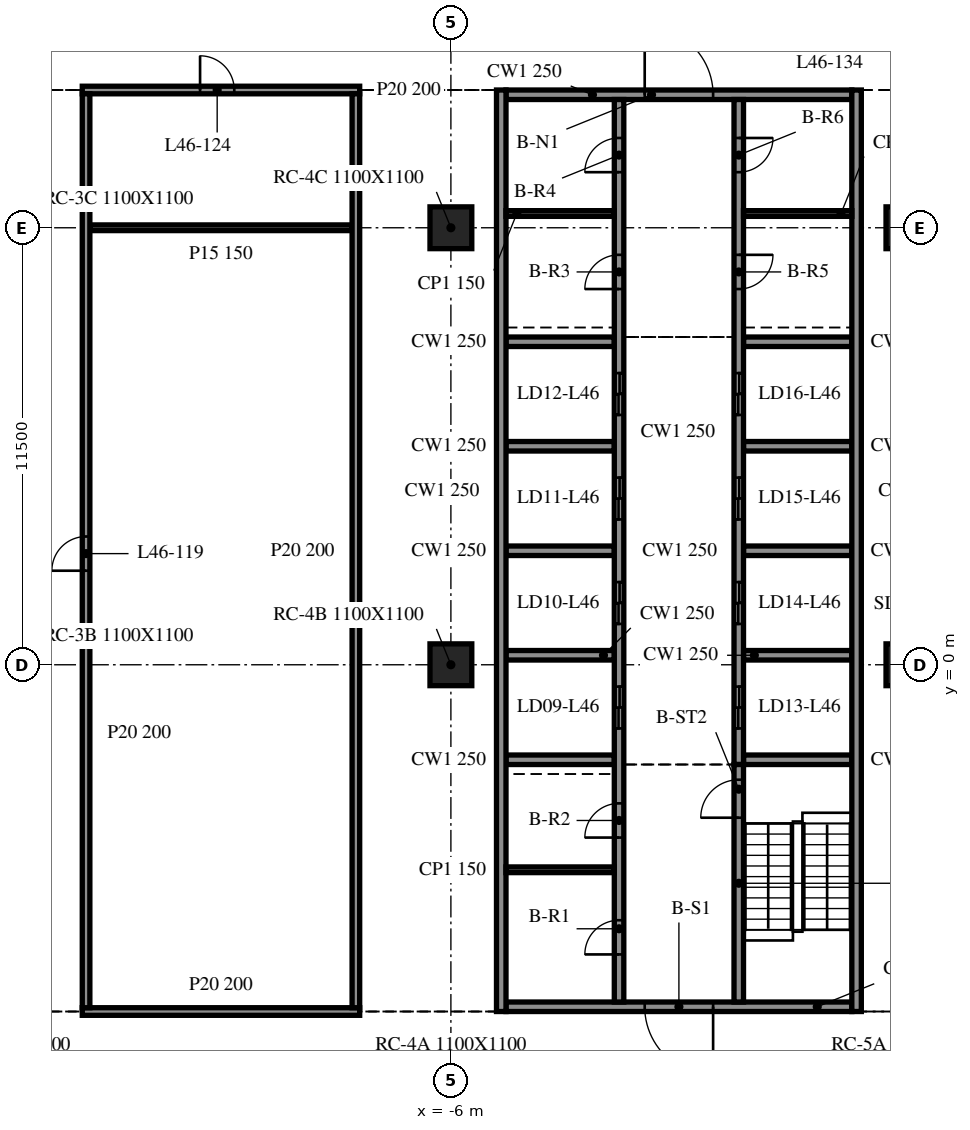
"""IFC4 building model, lengths in metres.
Left out: names, types, materials, properties, quantities, classifications, styles, units other than length and angle.
Written with IfcOpenShell. Run it as: python <this file> out.ifc"""

import sys

from ifc_helpers import new_model, si_unit, direction, frame, frame_2d, origin, origin_2d, place, context, subcontext, project, spatial, rectangle, extrude, element, fill, save


model = new_model("IFC4")
c1 = context("Model", 3, precision=1e-05, world=origin(), true_north=direction((0.0, 1.0)))
c2 = subcontext(c1, "Body", "Model", "MODEL_VIEW")
j1 = project(units=[si_unit("LENGTHUNIT", "METRE"), si_unit("PLANEANGLEUNIT", "RADIAN")], contexts=[c1])
p1 = place(None, origin())
s1 = spatial("IfcSite", under=j1, at=p1, CompositionType="ELEMENT")
p2 = place(p1, origin())
s2 = spatial("IfcBuilding", under=s1, at=p2, CompositionType="ELEMENT")
p3 = place(p2, frame((0.0, 0.0, 193.9)))
s3 = spatial("IfcBuildingStorey", under=s2, at=p3, CompositionType="ELEMENT", Elevation=193.9)
for number, where, z_axis, x_axis in (
    (1, (-6.0, 0.0, -0.34), (0.0, 0.0, 1.0), (1.0, 0.0, 0.0)),
    (2, (-6.0, 11.5, -0.34), (0.0, 0.0, 1.0), (1.0, 0.0, 0.0)),
    (3, (6.0, 0.0, -0.34), (0.0, 0.0, 1.0), (1.0, 0.0, 0.0)),
    (4, (6.0, 11.5, -0.34), (0.0, 0.0, 1.0), (1.0, 0.0, 0.0)),
):
    element("IfcColumn", number, at=place(p3, frame(where, z_axis=z_axis, x_axis=x_axis)), inside=s3, PredefinedType="COLUMN", context=c2, shape_type="SweptSolid", body=[
        extrude(rectangle(XDim=1.1, YDim=1.1, at=origin_2d()), origin(), (0.0, 0.0, 1.0), 3.8),
    ])
for number, where, z_axis, x_axis in (
    (5, (-4.675, 15.125, 0.0), (0.0, 0.0, 1.0), (0.0, -1.0, 0.0)),
    (6, (4.675, -9.125, 0.0), (0.0, 0.0, 1.0), (0.0, 1.0, 0.0)),
):
    element("IfcWall", number, at=place(p3, frame(where, z_axis=z_axis, x_axis=x_axis)), inside=s3, PredefinedType="SOLIDWALL", context=c2, shape_type="SweptSolid", body=[
        extrude(rectangle(XDim=24.25, YDim=0.25, at=frame_2d((12.125, 0.0))), origin(), (0.0, 0.0, 1.0), 3.46),
    ])
p4 = place(p3, frame((4.55, -9.0, 0.0), z_axis=(0.0, 0.0, 1.0), x_axis=(-1.0, 0.0, 0.0)))
e7 = element("IfcWall", 7, at=p4, inside=s3, PredefinedType="SOLIDWALL", context=c2, shape_type="SweptSolid", body=[
    extrude(rectangle(XDim=9.1, YDim=0.25, at=frame_2d((4.55, 0.0))), origin(), (0.0, 0.0, 1.0), 3.46),
])
p5 = place(p4, frame((3.65, 0.0, 0.0)))
e8 = element("IfcOpeningElement", 8, at=p5, cuts=e7, PredefinedType="OPENING", context=c2, shape_type="SweptSolid", body=[
    extrude(rectangle(XDim=1.8, YDim=2.1, at=frame_2d((0.9, 1.05))), frame((0.0, 0.135, 0.0), z_axis=(0.0, -1.0, 0.0), x_axis=(1.0, 0.0, 0.0)), (0.0, 0.0, 1.0), 0.27),
])
p6 = place(p3, frame((-4.55, 15.0, 0.0), z_axis=(0.0, 0.0, 1.0), x_axis=(1.0, 0.0, 0.0)))
e9 = element("IfcWall", 9, at=p6, inside=s3, PredefinedType="SOLIDWALL", context=c2, shape_type="SweptSolid", body=[
    extrude(rectangle(XDim=9.1, YDim=0.25, at=frame_2d((4.55, 0.0))), origin(), (0.0, 0.0, 1.0), 3.46),
])
p7 = place(p6, frame((3.65, 0.0, 0.0)))
e10 = element("IfcOpeningElement", 10, at=p7, cuts=e9, PredefinedType="OPENING", context=c2, shape_type="SweptSolid", body=[
    extrude(rectangle(XDim=1.8, YDim=2.1, at=frame_2d((0.9, 1.05))), frame((0.0, 0.135, 0.0), z_axis=(0.0, -1.0, 0.0), x_axis=(1.0, 0.0, 0.0)), (0.0, 0.0, 1.0), 0.27),
])
p8 = place(p3, frame((-1.575, -8.875, 0.0), z_axis=(0.0, 0.0, 1.0), x_axis=(0.0, 1.0, 0.0)))
e11 = element("IfcWall", 11, at=p8, inside=s3, PredefinedType="SOLIDWALL", context=c2, shape_type="SweptSolid", body=[
    extrude(rectangle(XDim=23.75, YDim=0.25, at=frame_2d((11.875, 0.0))), origin(), (0.0, 0.0, 1.0), 3.46),
])
p9 = place(p8, frame((7.2, 0.0, 0.0)))
e12 = element("IfcOpeningElement", 12, at=p9, cuts=e11, PredefinedType="OPENING", context=c2, shape_type="SweptSolid", body=[
    extrude(rectangle(XDim=1.1, YDim=2.1, at=frame_2d((0.55, 1.05))), frame((0.0, 0.135, 0.0), z_axis=(0.0, -1.0, 0.0), x_axis=(1.0, 0.0, 0.0)), (0.0, 0.0, 1.0), 0.27),
])
p10 = place(p8, frame((9.95, 0.0, 0.0)))
e13 = element("IfcOpeningElement", 13, at=p10, cuts=e11, PredefinedType="OPENING", context=c2, shape_type="SweptSolid", body=[
    extrude(rectangle(XDim=1.1, YDim=2.1, at=frame_2d((0.55, 1.05))), frame((0.0, 0.135, 0.0), z_axis=(0.0, -1.0, 0.0), x_axis=(1.0, 0.0, 0.0)), (0.0, 0.0, 1.0), 0.27),
])
p11 = place(p8, frame((12.7, 0.0, 0.0)))
e14 = element("IfcOpeningElement", 14, at=p11, cuts=e11, PredefinedType="OPENING", context=c2, shape_type="SweptSolid", body=[
    extrude(rectangle(XDim=1.1, YDim=2.1, at=frame_2d((0.55, 1.05))), frame((0.0, 0.135, 0.0), z_axis=(0.0, -1.0, 0.0), x_axis=(1.0, 0.0, 0.0)), (0.0, 0.0, 1.0), 0.27),
])
p12 = place(p8, frame((15.45, 0.0, 0.0)))
e15 = element("IfcOpeningElement", 15, at=p12, cuts=e11, PredefinedType="OPENING", context=c2, shape_type="SweptSolid", body=[
    extrude(rectangle(XDim=1.1, YDim=2.1, at=frame_2d((0.55, 1.05))), frame((0.0, 0.135, 0.0), z_axis=(0.0, -1.0, 0.0), x_axis=(1.0, 0.0, 0.0)), (0.0, 0.0, 1.0), 0.27),
])
p13 = place(p8, frame((1.252, 0.0, 0.0)))
e16 = element("IfcOpeningElement", 16, at=p13, cuts=e11, PredefinedType="OPENING", context=c2, shape_type="SweptSolid", body=[
    extrude(rectangle(XDim=0.9, YDim=2.1, at=frame_2d((0.45, 1.05))), frame((0.0, 0.135, 0.0), z_axis=(0.0, -1.0, 0.0), x_axis=(1.0, 0.0, 0.0)), (0.0, 0.0, 1.0), 0.27),
])
p14 = place(p8, frame((4.327, 0.0, 0.0)))
e17 = element("IfcOpeningElement", 17, at=p14, cuts=e11, PredefinedType="OPENING", context=c2, shape_type="SweptSolid", body=[
    extrude(rectangle(XDim=0.9, YDim=2.1, at=frame_2d((0.45, 1.05))), frame((0.0, 0.135, 0.0), z_axis=(0.0, -1.0, 0.0), x_axis=(1.0, 0.0, 0.0)), (0.0, 0.0, 1.0), 0.27),
])
p15 = place(p8, frame((18.762, 0.0, 0.0)))
e18 = element("IfcOpeningElement", 18, at=p15, cuts=e11, PredefinedType="OPENING", context=c2, shape_type="SweptSolid", body=[
    extrude(rectangle(XDim=0.9, YDim=2.1, at=frame_2d((0.45, 1.05))), frame((0.0, 0.135, 0.0), z_axis=(0.0, -1.0, 0.0), x_axis=(1.0, 0.0, 0.0)), (0.0, 0.0, 1.0), 0.27),
])
p16 = place(p8, frame((21.837, 0.0, 0.0)))
e19 = element("IfcOpeningElement", 19, at=p16, cuts=e11, PredefinedType="OPENING", context=c2, shape_type="SweptSolid", body=[
    extrude(rectangle(XDim=0.9, YDim=2.1, at=frame_2d((0.45, 1.05))), frame((0.0, 0.135, 0.0), z_axis=(0.0, -1.0, 0.0), x_axis=(1.0, 0.0, 0.0)), (0.0, 0.0, 1.0), 0.27),
])
p17 = place(p3, frame((1.575, -8.875, 0.0), z_axis=(0.0, 0.0, 1.0), x_axis=(0.0, 1.0, 0.0)))
e20 = element("IfcWall", 20, at=p17, inside=s3, PredefinedType="SOLIDWALL", context=c2, shape_type="SweptSolid", body=[
    extrude(rectangle(XDim=6.25, YDim=0.25, at=frame_2d((3.125, 0.0))), origin(), (0.0, 0.0, 1.0), 3.46),
])
p18 = place(p17, frame((4.85, 0.0, 0.0)))
e21 = element("IfcOpeningElement", 21, at=p18, cuts=e20, PredefinedType="OPENING", context=c2, shape_type="SweptSolid", body=[
    extrude(rectangle(XDim=1.0, YDim=2.1, at=frame_2d((0.5, 1.05))), frame((0.0, 0.135, 0.0), z_axis=(0.0, -1.0, 0.0), x_axis=(1.0, 0.0, 0.0)), (0.0, 0.0, 1.0), 0.27),
])
p19 = place(p3, frame((1.575, 14.875, 0.0), z_axis=(0.0, 0.0, 1.0), x_axis=(0.0, -1.0, 0.0)))
e22 = element("IfcWall", 22, at=p19, inside=s3, PredefinedType="SOLIDWALL", context=c2, shape_type="SweptSolid", body=[
    extrude(rectangle(XDim=17.5, YDim=0.25, at=frame_2d((8.75, 0.0))), origin(), (0.0, 0.0, 1.0), 3.46),
])
p20 = place(p19, frame((15.45, 0.0, 0.0)))
e23 = element("IfcOpeningElement", 23, at=p20, cuts=e22, PredefinedType="OPENING", context=c2, shape_type="SweptSolid", body=[
    extrude(rectangle(XDim=1.1, YDim=2.1, at=frame_2d((0.55, 1.05))), frame((0.0, 0.135, 0.0), z_axis=(0.0, -1.0, 0.0), x_axis=(1.0, 0.0, 0.0)), (0.0, 0.0, 1.0), 0.27),
])
p21 = place(p19, frame((12.7, 0.0, 0.0)))
e24 = element("IfcOpeningElement", 24, at=p21, cuts=e22, PredefinedType="OPENING", context=c2, shape_type="SweptSolid", body=[
    extrude(rectangle(XDim=1.1, YDim=2.1, at=frame_2d((0.55, 1.05))), frame((0.0, 0.135, 0.0), z_axis=(0.0, -1.0, 0.0), x_axis=(1.0, 0.0, 0.0)), (0.0, 0.0, 1.0), 0.27),
])
p22 = place(p19, frame((9.95, 0.0, 0.0)))
e25 = element("IfcOpeningElement", 25, at=p22, cuts=e22, PredefinedType="OPENING", context=c2, shape_type="SweptSolid", body=[
    extrude(rectangle(XDim=1.1, YDim=2.1, at=frame_2d((0.55, 1.05))), frame((0.0, 0.135, 0.0), z_axis=(0.0, -1.0, 0.0), x_axis=(1.0, 0.0, 0.0)), (0.0, 0.0, 1.0), 0.27),
])
p23 = place(p19, frame((7.2, 0.0, 0.0)))
e26 = element("IfcOpeningElement", 26, at=p23, cuts=e22, PredefinedType="OPENING", context=c2, shape_type="SweptSolid", body=[
    extrude(rectangle(XDim=1.1, YDim=2.1, at=frame_2d((0.55, 1.05))), frame((0.0, 0.135, 0.0), z_axis=(0.0, -1.0, 0.0), x_axis=(1.0, 0.0, 0.0)), (0.0, 0.0, 1.0), 0.27),
])
p24 = place(p19, frame((4.087, 0.0, 0.0)))
e27 = element("IfcOpeningElement", 27, at=p24, cuts=e22, PredefinedType="OPENING", context=c2, shape_type="SweptSolid", body=[
    extrude(rectangle(XDim=0.9, YDim=2.1, at=frame_2d((0.45, 1.05))), frame((0.0, 0.135, 0.0), z_axis=(0.0, -1.0, 0.0), x_axis=(1.0, 0.0, 0.0)), (0.0, 0.0, 1.0), 0.27),
])
p25 = place(p19, frame((1.012, 0.0, 0.0)))
e28 = element("IfcOpeningElement", 28, at=p25, cuts=e22, PredefinedType="OPENING", context=c2, shape_type="SweptSolid", body=[
    extrude(rectangle(XDim=0.9, YDim=2.1, at=frame_2d((0.45, 1.05))), frame((0.0, 0.135, 0.0), z_axis=(0.0, -1.0, 0.0), x_axis=(1.0, 0.0, 0.0)), (0.0, 0.0, 1.0), 0.27),
])
for number, where, z_axis, x_axis in (
    (29, (-4.55, -2.5, 0.0), (0.0, 0.0, 1.0), (1.0, 0.0, 0.0)),
    (30, (-4.55, 0.25, 0.0), (0.0, 0.0, 1.0), (1.0, 0.0, 0.0)),
    (31, (-4.55, 3.0, 0.0), (0.0, 0.0, 1.0), (1.0, 0.0, 0.0)),
    (32, (-4.55, 5.75, 0.0), (0.0, 0.0, 1.0), (1.0, 0.0, 0.0)),
    (33, (-4.55, 8.5, 0.0), (0.0, 0.0, 1.0), (1.0, 0.0, 0.0)),
    (34, (1.7, -2.5, 0.0), (0.0, 0.0, 1.0), (1.0, 0.0, 0.0)),
    (35, (1.7, 0.25, 0.0), (0.0, 0.0, 1.0), (1.0, 0.0, 0.0)),
    (36, (1.7, 3.0, 0.0), (0.0, 0.0, 1.0), (1.0, 0.0, 0.0)),
    (37, (1.7, 5.75, 0.0), (0.0, 0.0, 1.0), (1.0, 0.0, 0.0)),
    (38, (1.7, 8.5, 0.0), (0.0, 0.0, 1.0), (1.0, 0.0, 0.0)),
):
    element("IfcWall", number, at=place(p3, frame(where, z_axis=z_axis, x_axis=x_axis)), inside=s3, PredefinedType="SOLIDWALL", context=c2, shape_type="SweptSolid", body=[
        extrude(rectangle(XDim=2.85, YDim=0.25, at=frame_2d((1.425, 0.0))), origin(), (0.0, 0.0, 1.0), 3.46),
    ])
for number, where, z_axis, x_axis in (
    (39, (-4.55, -5.395, 0.0), (0.0, 0.0, 1.0), (1.0, 0.0, 0.0)),
    (40, (-4.55, 11.875, 0.0), (0.0, 0.0, 1.0), (1.0, 0.0, 0.0)),
    (41, (1.7, 11.875, 0.0), (0.0, 0.0, 1.0), (1.0, 0.0, 0.0)),
):
    element("IfcWall", number, at=place(p3, frame(where, z_axis=z_axis, x_axis=x_axis)), inside=s3, PredefinedType="PARTITIONING", context=c2, shape_type="SweptSolid", body=[
        extrude(rectangle(XDim=2.85, YDim=0.15, at=frame_2d((1.425, 0.0))), origin(), (0.0, 0.0, 1.0), 3.46),
    ])
p26 = place(p3, frame((-15.7, -9.125, 0.0), z_axis=(0.0, 0.0, 1.0), x_axis=(1.0, 0.0, 0.0)))
e42 = element("IfcWall", 42, at=p26, inside=s3, PredefinedType="PARTITIONING", context=c2, shape_type="SweptSolid", body=[
    extrude(rectangle(XDim=7.3, YDim=0.2, at=frame_2d((3.65, 0.0))), origin(), (0.0, 0.0, 1.0), 3.46),
])
p27 = place(p3, frame((-15.5, 11.5, 0.0), z_axis=(0.0, 0.0, 1.0), x_axis=(1.0, 0.0, 0.0)))
e43 = element("IfcWall", 43, at=p27, inside=s3, PredefinedType="PARTITIONING", context=c2, shape_type="SweptSolid", body=[
    extrude(rectangle(XDim=6.9, YDim=0.15, at=frame_2d((3.45, 0.0))), origin(), (0.0, 0.0, 1.0), 3.46),
])
p28 = place(p3, frame((-15.7, 15.125, 0.0), z_axis=(0.0, 0.0, 1.0), x_axis=(1.0, 0.0, 0.0)))
e44 = element("IfcWall", 44, at=p28, inside=s3, PredefinedType="PARTITIONING", context=c2, shape_type="SweptSolid", body=[
    extrude(rectangle(XDim=7.3, YDim=0.2, at=frame_2d((3.65, 0.0))), origin(), (0.0, 0.0, 1.0), 3.46),
])
p29 = place(p28, frame((3.1, 0.0, 0.0)))
e45 = element("IfcOpeningElement", 45, at=p29, cuts=e44, PredefinedType="OPENING", context=c2, shape_type="SweptSolid", body=[
    extrude(rectangle(XDim=0.9, YDim=2.1, at=frame_2d((0.45, 1.05))), frame((0.0, 0.11, 0.0), z_axis=(0.0, -1.0, 0.0), x_axis=(1.0, 0.0, 0.0)), (0.0, 0.0, 1.0), 0.22),
])
p30 = place(p3, frame((-15.6, -9.025, 0.0), z_axis=(0.0, 0.0, 1.0), x_axis=(0.0, 1.0, 0.0)))
e46 = element("IfcWall", 46, at=p30, inside=s3, PredefinedType="PARTITIONING", context=c2, shape_type="SweptSolid", body=[
    extrude(rectangle(XDim=24.05, YDim=0.2, at=frame_2d((12.025, 0.0))), origin(), (0.0, 0.0, 1.0), 3.46),
])
p31 = place(p30, frame((11.5, 0.0, 0.0)))
e47 = element("IfcOpeningElement", 47, at=p31, cuts=e46, PredefinedType="OPENING", context=c2, shape_type="SweptSolid", body=[
    extrude(rectangle(XDim=0.9, YDim=2.1, at=frame_2d((0.45, 1.05))), frame((0.0, 0.11, 0.0), z_axis=(0.0, -1.0, 0.0), x_axis=(1.0, 0.0, 0.0)), (0.0, 0.0, 1.0), 0.22),
])
p32 = place(p3, frame((-8.5, -9.025, 0.0), z_axis=(0.0, 0.0, 1.0), x_axis=(0.0, 1.0, 0.0)))
e48 = element("IfcWall", 48, at=p32, inside=s3, PredefinedType="PARTITIONING", context=c2, shape_type="SweptSolid", body=[
    extrude(rectangle(XDim=24.05, YDim=0.2, at=frame_2d((12.025, 0.0))), origin(), (0.0, 0.0, 1.0), 3.46),
])
p33 = place(p5, origin())
e49 = element("IfcDoor", 49, at=p33, inside=s3, OperationType="DOUBLE_DOOR_SINGLE_SWING", PredefinedType="DOOR", context=c2, shape_type="SweptSolid", body=[
    extrude(rectangle(XDim=1.8, YDim=2.1, at=frame_2d((0.9, 1.05))), frame((0.0, 0.025, 0.0), z_axis=(0.0, -1.0, 0.0), x_axis=(1.0, 0.0, 0.0)), (0.0, 0.0, 1.0), 0.05),
])
fill(e8, e49)
p34 = place(p7, origin())
e50 = element("IfcDoor", 50, at=p34, inside=s3, OperationType="DOUBLE_DOOR_SINGLE_SWING", PredefinedType="DOOR", context=c2, shape_type="SweptSolid", body=[
    extrude(rectangle(XDim=1.8, YDim=2.1, at=frame_2d((0.9, 1.05))), frame((0.0, 0.025, 0.0), z_axis=(0.0, -1.0, 0.0), x_axis=(1.0, 0.0, 0.0)), (0.0, 0.0, 1.0), 0.05),
])
fill(e10, e50)
p35 = place(p20, origin())
e51 = element("IfcDoor", 51, at=p35, inside=s3, OperationType="DOUBLE_DOOR_SLIDING", PredefinedType="DOOR", context=c2, shape_type="SweptSolid", body=[
    extrude(rectangle(XDim=1.1, YDim=2.1, at=frame_2d((0.55, 1.05))), frame((0.0, 0.025, 0.0), z_axis=(0.0, -1.0, 0.0), x_axis=(1.0, 0.0, 0.0)), (0.0, 0.0, 1.0), 0.05),
])
fill(e23, e51)
p36 = place(p21, origin())
e52 = element("IfcDoor", 52, at=p36, inside=s3, OperationType="DOUBLE_DOOR_SLIDING", PredefinedType="DOOR", context=c2, shape_type="SweptSolid", body=[
    extrude(rectangle(XDim=1.1, YDim=2.1, at=frame_2d((0.55, 1.05))), frame((0.0, 0.025, 0.0), z_axis=(0.0, -1.0, 0.0), x_axis=(1.0, 0.0, 0.0)), (0.0, 0.0, 1.0), 0.05),
])
fill(e24, e52)
p37 = place(p22, origin())
e53 = element("IfcDoor", 53, at=p37, inside=s3, OperationType="DOUBLE_DOOR_SLIDING", PredefinedType="DOOR", context=c2, shape_type="SweptSolid", body=[
    extrude(rectangle(XDim=1.1, YDim=2.1, at=frame_2d((0.55, 1.05))), frame((0.0, 0.025, 0.0), z_axis=(0.0, -1.0, 0.0), x_axis=(1.0, 0.0, 0.0)), (0.0, 0.0, 1.0), 0.05),
])
fill(e25, e53)
p38 = place(p23, origin())
e54 = element("IfcDoor", 54, at=p38, inside=s3, OperationType="DOUBLE_DOOR_SLIDING", PredefinedType="DOOR", context=c2, shape_type="SweptSolid", body=[
    extrude(rectangle(XDim=1.1, YDim=2.1, at=frame_2d((0.55, 1.05))), frame((0.0, 0.025, 0.0), z_axis=(0.0, -1.0, 0.0), x_axis=(1.0, 0.0, 0.0)), (0.0, 0.0, 1.0), 0.05),
])
fill(e26, e54)
p39 = place(p9, origin())
e55 = element("IfcDoor", 55, at=p39, inside=s3, OperationType="DOUBLE_DOOR_SLIDING", PredefinedType="DOOR", context=c2, shape_type="SweptSolid", body=[
    extrude(rectangle(XDim=1.1, YDim=2.1, at=frame_2d((0.55, 1.05))), frame((0.0, 0.025, 0.0), z_axis=(0.0, -1.0, 0.0), x_axis=(1.0, 0.0, 0.0)), (0.0, 0.0, 1.0), 0.05),
])
fill(e12, e55)
p40 = place(p10, origin())
e56 = element("IfcDoor", 56, at=p40, inside=s3, OperationType="DOUBLE_DOOR_SLIDING", PredefinedType="DOOR", context=c2, shape_type="SweptSolid", body=[
    extrude(rectangle(XDim=1.1, YDim=2.1, at=frame_2d((0.55, 1.05))), frame((0.0, 0.025, 0.0), z_axis=(0.0, -1.0, 0.0), x_axis=(1.0, 0.0, 0.0)), (0.0, 0.0, 1.0), 0.05),
])
fill(e13, e56)
p41 = place(p11, origin())
e57 = element("IfcDoor", 57, at=p41, inside=s3, OperationType="DOUBLE_DOOR_SLIDING", PredefinedType="DOOR", context=c2, shape_type="SweptSolid", body=[
    extrude(rectangle(XDim=1.1, YDim=2.1, at=frame_2d((0.55, 1.05))), frame((0.0, 0.025, 0.0), z_axis=(0.0, -1.0, 0.0), x_axis=(1.0, 0.0, 0.0)), (0.0, 0.0, 1.0), 0.05),
])
fill(e14, e57)
p42 = place(p12, origin())
e58 = element("IfcDoor", 58, at=p42, inside=s3, OperationType="DOUBLE_DOOR_SLIDING", PredefinedType="DOOR", context=c2, shape_type="SweptSolid", body=[
    extrude(rectangle(XDim=1.1, YDim=2.1, at=frame_2d((0.55, 1.05))), frame((0.0, 0.025, 0.0), z_axis=(0.0, -1.0, 0.0), x_axis=(1.0, 0.0, 0.0)), (0.0, 0.0, 1.0), 0.05),
])
fill(e15, e58)
p43 = place(p13, origin())
e59 = element("IfcDoor", 59, at=p43, inside=s3, OperationType="SINGLE_SWING_LEFT", PredefinedType="DOOR", context=c2, shape_type="SweptSolid", body=[
    extrude(rectangle(XDim=0.9, YDim=2.1, at=frame_2d((0.45, 1.05))), frame((0.0, 0.025, 0.0), z_axis=(0.0, -1.0, 0.0), x_axis=(1.0, 0.0, 0.0)), (0.0, 0.0, 1.0), 0.05),
])
fill(e16, e59)
p44 = place(p14, origin())
e60 = element("IfcDoor", 60, at=p44, inside=s3, OperationType="SINGLE_SWING_RIGHT", PredefinedType="DOOR", context=c2, shape_type="SweptSolid", body=[
    extrude(rectangle(XDim=0.9, YDim=2.1, at=frame_2d((0.45, 1.05))), frame((0.0, 0.025, 0.0), z_axis=(0.0, -1.0, 0.0), x_axis=(1.0, 0.0, 0.0)), (0.0, 0.0, 1.0), 0.05),
])
fill(e17, e60)
p45 = place(p15, origin())
e61 = element("IfcDoor", 61, at=p45, inside=s3, OperationType="SINGLE_SWING_LEFT", PredefinedType="DOOR", context=c2, shape_type="SweptSolid", body=[
    extrude(rectangle(XDim=0.9, YDim=2.1, at=frame_2d((0.45, 1.05))), frame((0.0, 0.025, 0.0), z_axis=(0.0, -1.0, 0.0), x_axis=(1.0, 0.0, 0.0)), (0.0, 0.0, 1.0), 0.05),
])
fill(e18, e61)
p46 = place(p16, origin())
e62 = element("IfcDoor", 62, at=p46, inside=s3, OperationType="SINGLE_SWING_RIGHT", PredefinedType="DOOR", context=c2, shape_type="SweptSolid", body=[
    extrude(rectangle(XDim=0.9, YDim=2.1, at=frame_2d((0.45, 1.05))), frame((0.0, 0.025, 0.0), z_axis=(0.0, -1.0, 0.0), x_axis=(1.0, 0.0, 0.0)), (0.0, 0.0, 1.0), 0.05),
])
fill(e19, e62)
p47 = place(p24, origin())
e63 = element("IfcDoor", 63, at=p47, inside=s3, OperationType="SINGLE_SWING_LEFT", PredefinedType="DOOR", context=c2, shape_type="SweptSolid", body=[
    extrude(rectangle(XDim=0.9, YDim=2.1, at=frame_2d((0.45, 1.05))), frame((0.0, 0.025, 0.0), z_axis=(0.0, -1.0, 0.0), x_axis=(1.0, 0.0, 0.0)), (0.0, 0.0, 1.0), 0.05),
])
fill(e27, e63)
p48 = place(p25, origin())
e64 = element("IfcDoor", 64, at=p48, inside=s3, OperationType="SINGLE_SWING_RIGHT", PredefinedType="DOOR", context=c2, shape_type="SweptSolid", body=[
    extrude(rectangle(XDim=0.9, YDim=2.1, at=frame_2d((0.45, 1.05))), frame((0.0, 0.025, 0.0), z_axis=(0.0, -1.0, 0.0), x_axis=(1.0, 0.0, 0.0)), (0.0, 0.0, 1.0), 0.05),
])
fill(e28, e64)
p49 = place(p18, origin())
e65 = element("IfcDoor", 65, at=p49, inside=s3, OperationType="SINGLE_SWING_LEFT", PredefinedType="DOOR", context=c2, shape_type="SweptSolid", body=[
    extrude(rectangle(XDim=1.0, YDim=2.1, at=frame_2d((0.5, 1.05))), frame((0.0, 0.025, 0.0), z_axis=(0.0, -1.0, 0.0), x_axis=(1.0, 0.0, 0.0)), (0.0, 0.0, 1.0), 0.05),
])
fill(e21, e65)
p50 = place(p31, origin())
e66 = element("IfcDoor", 66, at=p50, inside=s3, OperationType="SINGLE_SWING_RIGHT", PredefinedType="DOOR", context=c2, shape_type="SweptSolid", body=[
    extrude(rectangle(XDim=0.9, YDim=2.1, at=frame_2d((0.45, 1.05))), frame((0.0, 0.025, 0.0), z_axis=(0.0, -1.0, 0.0), x_axis=(1.0, 0.0, 0.0)), (0.0, 0.0, 1.0), 0.05),
])
fill(e47, e66)
p51 = place(p29, origin())
e67 = element("IfcDoor", 67, at=p51, inside=s3, OperationType="SINGLE_SWING_RIGHT", PredefinedType="DOOR", context=c2, shape_type="SweptSolid", body=[
    extrude(rectangle(XDim=0.9, YDim=2.1, at=frame_2d((0.45, 1.05))), frame((0.0, 0.025, 0.0), z_axis=(0.0, -1.0, 0.0), x_axis=(1.0, 0.0, 0.0)), (0.0, 0.0, 1.0), 0.05),
])
fill(e45, e67)
save(model, sys.argv[1])
